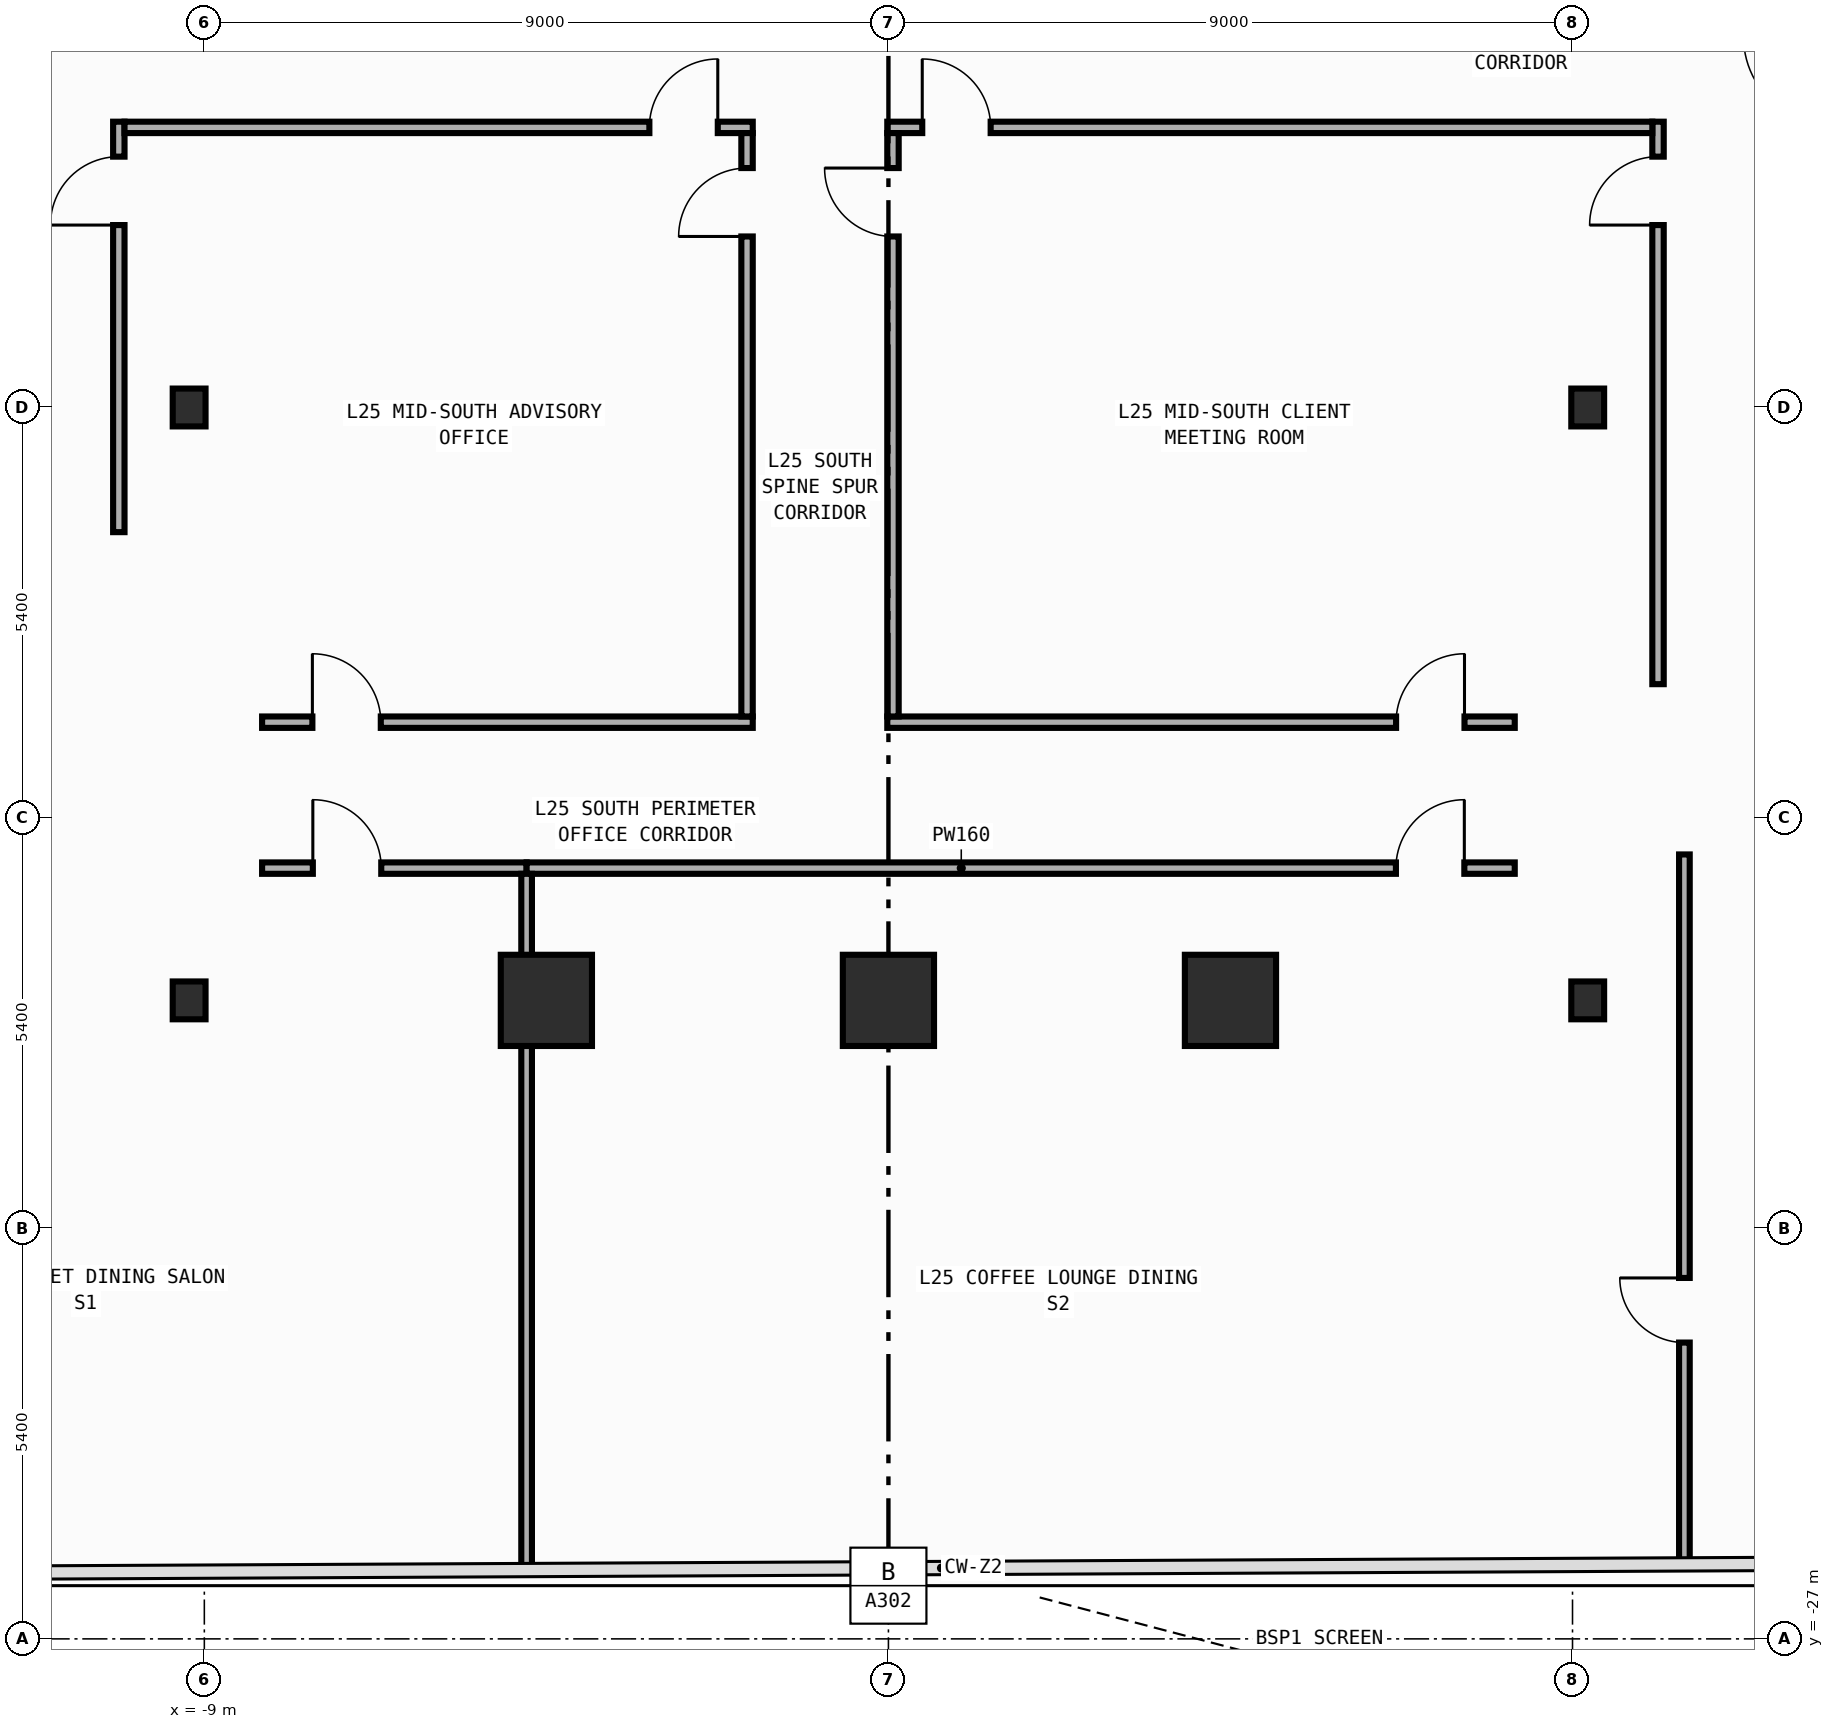
"""IFC4 building model, lengths in metres.
Left out: names, types, materials, properties, quantities, classifications, styles, units other than length and angle.
Written with IfcOpenShell. Run it as: python <this file> out.ifc"""

import sys

from ifc_helpers import new_model, si_unit, direction, frame, frame_2d, origin, origin_2d, place, context, subcontext, project, spatial, rectangle, i_section, extrude, element, fill, save


model = new_model("IFC4")
c1 = context("Model", 3, precision=1e-05, world=origin(), true_north=direction((0.0, 1.0)))
c2 = subcontext(c1, "Body", "Model", "MODEL_VIEW")
j1 = project(units=[si_unit("LENGTHUNIT", "METRE"), si_unit("PLANEANGLEUNIT", "RADIAN")], contexts=[c1])
p1 = place(None, origin())
s1 = spatial("IfcSite", under=j1, at=p1, CompositionType="ELEMENT")
p2 = place(p1, origin())
s2 = spatial("IfcBuilding", under=s1, at=p2, CompositionType="ELEMENT")
p3 = place(p2, frame((0.0, 0.0, 110.0)))
s3 = spatial("IfcBuildingStorey", under=s2, at=p3, CompositionType="ELEMENT", Elevation=110.0)
for number, where, z_axis, x_axis in (
    (1, (-9.2, -18.6, 0.0), (0.0, 0.0, 1.0), (1.0, 0.0, 0.0)),
    (2, (-9.2, -10.8, 0.0), (0.0, 0.0, 1.0), (1.0, 0.0, 0.0)),
    (3, (9.2, -18.6, 0.0), (0.0, 0.0, 1.0), (1.0, 0.0, 0.0)),
    (4, (9.2, -10.8, 0.0), (0.0, 0.0, 1.0), (1.0, 0.0, 0.0)),
):
    element("IfcColumn", number, at=place(p3, frame(where, z_axis=z_axis, x_axis=x_axis)), inside=s3, PredefinedType="COLUMN", context=c2, shape_type="SweptSolid", body=[
        extrude(i_section(OverallWidth=0.432, OverallDepth=0.498, WebThickness=0.045, FlangeThickness=0.07, FilletRadius=0.022, at=origin_2d()), origin(), (0.0, 0.0, 1.0), 4.2),
    ])
for number, where, z_axis, x_axis in (
    (5, (-4.5, -18.6, 0.0), (0.0, 0.0, 1.0), (1.0, 0.0, 0.0)),
    (6, (0.0, -18.6, 0.0), (0.0, 0.0, 1.0), (1.0, 0.0, 0.0)),
    (7, (4.5, -18.6, 0.0), (0.0, 0.0, 1.0), (1.0, 0.0, 0.0)),
):
    element("IfcColumn", number, at=place(p3, frame(where, z_axis=z_axis, x_axis=x_axis)), inside=s3, PredefinedType="COLUMN", context=c2, shape_type="SweptSolid", body=[
        extrude(rectangle(XDim=1.2, YDim=1.2, at=origin_2d()), origin(), (0.0, 0.0, 1.0), 4.2),
    ])
p4 = place(p3, frame((-10.125, -12.44, 0.0), z_axis=(0.0, 0.0, 1.0), x_axis=(0.0, 1.0, 0.0)))
e8 = element("IfcWall", 8, at=p4, inside=s3, PredefinedType="PARTITIONING", context=c2, shape_type="SweptSolid", body=[
    extrude(rectangle(XDim=5.4, YDim=0.15, at=frame_2d((2.7, 0.0))), origin(), (0.0, 0.0, 1.0), 3.94),
])
p5 = place(p4, frame((4.04, 0.0, 0.0)))
e9 = element("IfcOpeningElement", 9, at=p5, cuts=e8, PredefinedType="OPENING", context=c2, shape_type="SweptSolid", body=[
    extrude(rectangle(XDim=0.9, YDim=2.15, at=frame_2d((0.45, 1.075))), frame((0.0, 0.085, 0.0), z_axis=(0.0, -1.0, 0.0), x_axis=(1.0, 0.0, 0.0)), (0.0, 0.0, 1.0), 0.17),
])
p6 = place(p3, frame((10.125, -14.44, 0.0), z_axis=(0.0, 0.0, 1.0), x_axis=(0.0, 1.0, 0.0)))
e10 = element("IfcWall", 10, at=p6, inside=s3, PredefinedType="PARTITIONING", context=c2, shape_type="SweptSolid", body=[
    extrude(rectangle(XDim=7.4, YDim=0.15, at=frame_2d((3.7, 0.0))), origin(), (0.0, 0.0, 1.0), 3.94),
])
p7 = place(p6, frame((6.04, 0.0, 0.0)))
e11 = element("IfcOpeningElement", 11, at=p7, cuts=e10, PredefinedType="OPENING", context=c2, shape_type="SweptSolid", body=[
    extrude(rectangle(XDim=0.9, YDim=2.15, at=frame_2d((0.45, 1.075))), frame((0.0, 0.085, 0.0), z_axis=(0.0, -1.0, 0.0), x_axis=(1.0, 0.0, 0.0)), (0.0, 0.0, 1.0), 0.17),
])
p8 = place(p3, frame((-10.05, -7.115, 0.0), z_axis=(0.0, 0.0, 1.0), x_axis=(1.0, 0.0, 0.0)))
e12 = element("IfcWall", 12, at=p8, inside=s3, PredefinedType="PARTITIONING", context=c2, shape_type="SweptSolid", body=[
    extrude(rectangle(XDim=8.265, YDim=0.15, at=frame_2d((4.133, 0.0))), origin(), (0.0, 0.0, 1.0), 3.94),
])
p9 = place(p8, frame((6.905, 0.0, 0.0)))
e13 = element("IfcOpeningElement", 13, at=p9, cuts=e12, PredefinedType="OPENING", context=c2, shape_type="SweptSolid", body=[
    extrude(rectangle(XDim=0.9, YDim=2.15, at=frame_2d((0.45, 1.075))), frame((0.0, 0.085, 0.0), z_axis=(0.0, -1.0, 0.0), x_axis=(1.0, 0.0, 0.0)), (0.0, 0.0, 1.0), 0.17),
])
p10 = place(p3, frame((-0.015, -7.115, 0.0), z_axis=(0.0, 0.0, 1.0), x_axis=(1.0, 0.0, 0.0)))
e14 = element("IfcWall", 14, at=p10, inside=s3, PredefinedType="PARTITIONING", context=c2, shape_type="SweptSolid", body=[
    extrude(rectangle(XDim=10.065, YDim=0.15, at=frame_2d((5.032, 0.0))), origin(), (0.0, 0.0, 1.0), 3.94),
])
p11 = place(p10, frame((0.46, 0.0, 0.0)))
e15 = element("IfcOpeningElement", 15, at=p11, cuts=e14, PredefinedType="OPENING", context=c2, shape_type="SweptSolid", body=[
    extrude(rectangle(XDim=0.9, YDim=2.15, at=frame_2d((0.45, 1.075))), frame((0.0, 0.085, 0.0), z_axis=(0.0, -1.0, 0.0), x_axis=(1.0, 0.0, 0.0)), (0.0, 0.0, 1.0), 0.17),
])
p12 = place(p3, frame((-8.24, -16.86, 0.0), z_axis=(0.0, 0.0, 1.0), x_axis=(1.0, 0.0, 0.0)))
e16 = element("IfcWall", 16, at=p12, inside=s3, PredefinedType="PARTITIONING", context=c2, shape_type="SweptSolid", body=[
    extrude(rectangle(XDim=3.48, YDim=0.15, at=frame_2d((1.74, 0.0))), origin(), (0.0, 0.0, 1.0), 3.94),
])
p13 = place(p12, frame((0.667, 0.0, 0.0)))
e17 = element("IfcOpeningElement", 17, at=p13, cuts=e16, PredefinedType="OPENING", context=c2, shape_type="SweptSolid", body=[
    extrude(rectangle(XDim=0.9, YDim=2.15, at=frame_2d((0.45, 1.075))), frame((0.0, 0.085, 0.0), z_axis=(0.0, -1.0, 0.0), x_axis=(1.0, 0.0, 0.0)), (0.0, 0.0, 1.0), 0.17),
])
p14 = place(p3, frame((-4.76, -16.86, 0.0), z_axis=(0.0, 0.0, 1.0), x_axis=(1.0, 0.0, 0.0)))
e18 = element("IfcWall", 18, at=p14, inside=s3, PredefinedType="PARTITIONING", context=c2, shape_type="SweptSolid", body=[
    extrude(rectangle(XDim=13.0, YDim=0.15, at=frame_2d((6.5, 0.0))), origin(), (0.0, 0.0, 1.0), 3.94),
])
p15 = place(p14, frame((11.437, 0.0, 0.0)))
e19 = element("IfcOpeningElement", 19, at=p15, cuts=e18, PredefinedType="OPENING", context=c2, shape_type="SweptSolid", body=[
    extrude(rectangle(XDim=0.9, YDim=2.15, at=frame_2d((0.45, 1.075))), frame((0.0, 0.085, 0.0), z_axis=(0.0, -1.0, 0.0), x_axis=(1.0, 0.0, 0.0)), (0.0, 0.0, 1.0), 0.17),
])
p16 = place(p3, frame((-8.24, -14.94, 0.0), z_axis=(0.0, 0.0, 1.0), x_axis=(1.0, 0.0, 0.0)))
e20 = element("IfcWall", 20, at=p16, inside=s3, PredefinedType="PARTITIONING", context=c2, shape_type="SweptSolid", body=[
    extrude(rectangle(XDim=6.455, YDim=0.15, at=frame_2d((3.228, 0.0))), origin(), (0.0, 0.0, 1.0), 3.94),
])
p17 = place(p16, frame((0.662, 0.0, 0.0)))
e21 = element("IfcOpeningElement", 21, at=p17, cuts=e20, PredefinedType="OPENING", context=c2, shape_type="SweptSolid", body=[
    extrude(rectangle(XDim=0.9, YDim=2.15, at=frame_2d((0.45, 1.075))), frame((0.0, 0.085, 0.0), z_axis=(0.0, -1.0, 0.0), x_axis=(1.0, 0.0, 0.0)), (0.0, 0.0, 1.0), 0.17),
])
p18 = place(p3, frame((-0.015, -14.94, 0.0), z_axis=(0.0, 0.0, 1.0), x_axis=(1.0, 0.0, 0.0)))
e22 = element("IfcWall", 22, at=p18, inside=s3, PredefinedType="PARTITIONING", context=c2, shape_type="SweptSolid", body=[
    extrude(rectangle(XDim=8.255, YDim=0.15, at=frame_2d((4.127, 0.0))), origin(), (0.0, 0.0, 1.0), 3.94),
])
p19 = place(p18, frame((6.694, 0.0, 0.0)))
e23 = element("IfcOpeningElement", 23, at=p19, cuts=e22, PredefinedType="OPENING", context=c2, shape_type="SweptSolid", body=[
    extrude(rectangle(XDim=0.9, YDim=2.15, at=frame_2d((0.45, 1.075))), frame((0.0, 0.085, 0.0), z_axis=(0.0, -1.0, 0.0), x_axis=(1.0, 0.0, 0.0)), (0.0, 0.0, 1.0), 0.17),
])
p20 = place(p3, frame((-1.86, -14.865, 0.0), z_axis=(0.0, 0.0, 1.0), x_axis=(0.0, 1.0, 0.0)))
e24 = element("IfcWall", 24, at=p20, inside=s3, PredefinedType="PARTITIONING", context=c2, shape_type="SweptSolid", body=[
    extrude(rectangle(XDim=7.675, YDim=0.15, at=frame_2d((3.837, 0.0))), origin(), (0.0, 0.0, 1.0), 3.94),
])
p21 = place(p20, frame((6.315, 0.0, 0.0)))
e25 = element("IfcOpeningElement", 25, at=p21, cuts=e24, PredefinedType="OPENING", context=c2, shape_type="SweptSolid", body=[
    extrude(rectangle(XDim=0.9, YDim=2.15, at=frame_2d((0.45, 1.075))), frame((0.0, 0.085, 0.0), z_axis=(0.0, -1.0, 0.0), x_axis=(1.0, 0.0, 0.0)), (0.0, 0.0, 1.0), 0.17),
])
p22 = place(p3, frame((0.06, -14.865, 0.0), z_axis=(0.0, 0.0, 1.0), x_axis=(0.0, 1.0, 0.0)))
e26 = element("IfcWall", 26, at=p22, inside=s3, PredefinedType="PARTITIONING", context=c2, shape_type="SweptSolid", body=[
    extrude(rectangle(XDim=7.675, YDim=0.15, at=frame_2d((3.837, 0.0))), origin(), (0.0, 0.0, 1.0), 3.94),
])
p23 = place(p22, frame((6.315, 0.0, 0.0)))
e27 = element("IfcOpeningElement", 27, at=p23, cuts=e26, PredefinedType="OPENING", context=c2, shape_type="SweptSolid", body=[
    extrude(rectangle(XDim=0.9, YDim=2.15, at=frame_2d((0.45, 1.075))), frame((0.0, 0.085, 0.0), z_axis=(0.0, -1.0, 0.0), x_axis=(1.0, 0.0, 0.0)), (0.0, 0.0, 1.0), 0.17),
])
p24 = place(p3, frame((-4.76, -26.09, 0.0), z_axis=(0.0, 0.0, 1.0), x_axis=(0.0, 1.0, 0.0)))
e28 = element("IfcWall", 28, at=p24, inside=s3, PredefinedType="PARTITIONING", context=c2, shape_type="SweptSolid", body=[
    extrude(rectangle(XDim=9.155, YDim=0.14, at=frame_2d((4.577, 0.0))), origin(), (0.0, 0.0, 1.0), 3.49),
])
p25 = place(p3, frame((10.472, -26.015, 0.0), z_axis=(0.0, 0.0, 1.0), x_axis=(0.0, 1.0, 0.0)))
e29 = element("IfcWall", 29, at=p25, inside=s3, PredefinedType="PARTITIONING", context=c2, shape_type="SweptSolid", body=[
    extrude(rectangle(XDim=9.335, YDim=0.14, at=frame_2d((4.668, 0.0))), origin(), (0.0, 0.0, 1.0), 3.94),
])
p26 = place(p25, frame((2.914, 0.0, 0.0)))
e30 = element("IfcOpeningElement", 30, at=p26, cuts=e29, PredefinedType="OPENING", context=c2, shape_type="SweptSolid", body=[
    extrude(rectangle(XDim=0.85, YDim=2.1, at=frame_2d((0.425, 1.05))), frame((0.0, 0.08, 0.0), z_axis=(0.0, -1.0, 0.0), x_axis=(1.0, 0.0, 0.0)), (0.0, 0.0, 1.0), 0.16),
])
p27 = place(p5, origin())
e31 = element("IfcDoor", 31, at=p27, inside=s3, OperationType="SINGLE_SWING_LEFT", PredefinedType="DOOR", context=c2, shape_type="SweptSolid", body=[
    extrude(rectangle(XDim=0.9, YDim=2.15, at=frame_2d((0.45, 1.075))), frame((0.0, 0.025, 0.0), z_axis=(0.0, -1.0, 0.0), x_axis=(1.0, 0.0, 0.0)), (0.0, 0.0, 1.0), 0.05),
])
fill(e9, e31)
p28 = place(p7, origin())
e32 = element("IfcDoor", 32, at=p28, inside=s3, OperationType="SINGLE_SWING_LEFT", PredefinedType="DOOR", context=c2, shape_type="SweptSolid", body=[
    extrude(rectangle(XDim=0.9, YDim=2.15, at=frame_2d((0.45, 1.075))), frame((0.0, 0.025, 0.0), z_axis=(0.0, -1.0, 0.0), x_axis=(1.0, 0.0, 0.0)), (0.0, 0.0, 1.0), 0.05),
])
fill(e11, e32)
p29 = place(p9, origin())
e33 = element("IfcDoor", 33, at=p29, inside=s3, OperationType="SINGLE_SWING_RIGHT", PredefinedType="DOOR", context=c2, shape_type="SweptSolid", body=[
    extrude(rectangle(XDim=0.9, YDim=2.15, at=frame_2d((0.45, 1.075))), frame((0.0, 0.025, 0.0), z_axis=(0.0, -1.0, 0.0), x_axis=(1.0, 0.0, 0.0)), (0.0, 0.0, 1.0), 0.05),
])
fill(e13, e33)
p30 = place(p11, origin())
e34 = element("IfcDoor", 34, at=p30, inside=s3, OperationType="SINGLE_SWING_LEFT", PredefinedType="DOOR", context=c2, shape_type="SweptSolid", body=[
    extrude(rectangle(XDim=0.9, YDim=2.15, at=frame_2d((0.45, 1.075))), frame((0.0, 0.025, 0.0), z_axis=(0.0, -1.0, 0.0), x_axis=(1.0, 0.0, 0.0)), (0.0, 0.0, 1.0), 0.05),
])
fill(e15, e34)
p31 = place(p13, origin())
e35 = element("IfcDoor", 35, at=p31, inside=s3, OperationType="SINGLE_SWING_LEFT", PredefinedType="DOOR", context=c2, shape_type="SweptSolid", body=[
    extrude(rectangle(XDim=0.9, YDim=2.15, at=frame_2d((0.45, 1.075))), frame((0.0, 0.025, 0.0), z_axis=(0.0, -1.0, 0.0), x_axis=(1.0, 0.0, 0.0)), (0.0, 0.0, 1.0), 0.05),
])
fill(e17, e35)
p32 = place(p15, origin())
e36 = element("IfcDoor", 36, at=p32, inside=s3, OperationType="SINGLE_SWING_RIGHT", PredefinedType="DOOR", context=c2, shape_type="SweptSolid", body=[
    extrude(rectangle(XDim=0.9, YDim=2.15, at=frame_2d((0.45, 1.075))), frame((0.0, 0.025, 0.0), z_axis=(0.0, -1.0, 0.0), x_axis=(1.0, 0.0, 0.0)), (0.0, 0.0, 1.0), 0.05),
])
fill(e19, e36)
p33 = place(p17, origin())
e37 = element("IfcDoor", 37, at=p33, inside=s3, OperationType="SINGLE_SWING_LEFT", PredefinedType="DOOR", context=c2, shape_type="SweptSolid", body=[
    extrude(rectangle(XDim=0.9, YDim=2.15, at=frame_2d((0.45, 1.075))), frame((0.0, 0.025, 0.0), z_axis=(0.0, -1.0, 0.0), x_axis=(1.0, 0.0, 0.0)), (0.0, 0.0, 1.0), 0.05),
])
fill(e21, e37)
p34 = place(p19, origin())
e38 = element("IfcDoor", 38, at=p34, inside=s3, OperationType="SINGLE_SWING_RIGHT", PredefinedType="DOOR", context=c2, shape_type="SweptSolid", body=[
    extrude(rectangle(XDim=0.9, YDim=2.15, at=frame_2d((0.45, 1.075))), frame((0.0, 0.025, 0.0), z_axis=(0.0, -1.0, 0.0), x_axis=(1.0, 0.0, 0.0)), (0.0, 0.0, 1.0), 0.05),
])
fill(e23, e38)
p35 = place(p21, origin())
e39 = element("IfcDoor", 39, at=p35, inside=s3, OperationType="SINGLE_SWING_LEFT", PredefinedType="DOOR", context=c2, shape_type="SweptSolid", body=[
    extrude(rectangle(XDim=0.9, YDim=2.15, at=frame_2d((0.45, 1.075))), frame((0.0, 0.025, 0.0), z_axis=(0.0, -1.0, 0.0), x_axis=(1.0, 0.0, 0.0)), (0.0, 0.0, 1.0), 0.05),
])
fill(e25, e39)
p36 = place(p23, origin())
e40 = element("IfcDoor", 40, at=p36, inside=s3, OperationType="SINGLE_SWING_RIGHT", PredefinedType="DOOR", context=c2, shape_type="SweptSolid", body=[
    extrude(rectangle(XDim=0.9, YDim=2.15, at=frame_2d((0.45, 1.075))), frame((0.0, 0.025, 0.0), z_axis=(0.0, -1.0, 0.0), x_axis=(1.0, 0.0, 0.0)), (0.0, 0.0, 1.0), 0.05),
])
fill(e27, e40)
p37 = place(p26, origin())
e41 = element("IfcDoor", 41, at=p37, inside=s3, OperationType="SINGLE_SWING_RIGHT", PredefinedType="DOOR", context=c2, shape_type="SweptSolid", body=[
    extrude(rectangle(XDim=0.85, YDim=2.1, at=frame_2d((0.425, 1.05))), frame((0.0, 0.025, 0.0), z_axis=(0.0, -1.0, 0.0), x_axis=(1.0, 0.0, 0.0)), (0.0, 0.0, 1.0), 0.05),
])
fill(e30, e41)
save(model, sys.argv[1])
